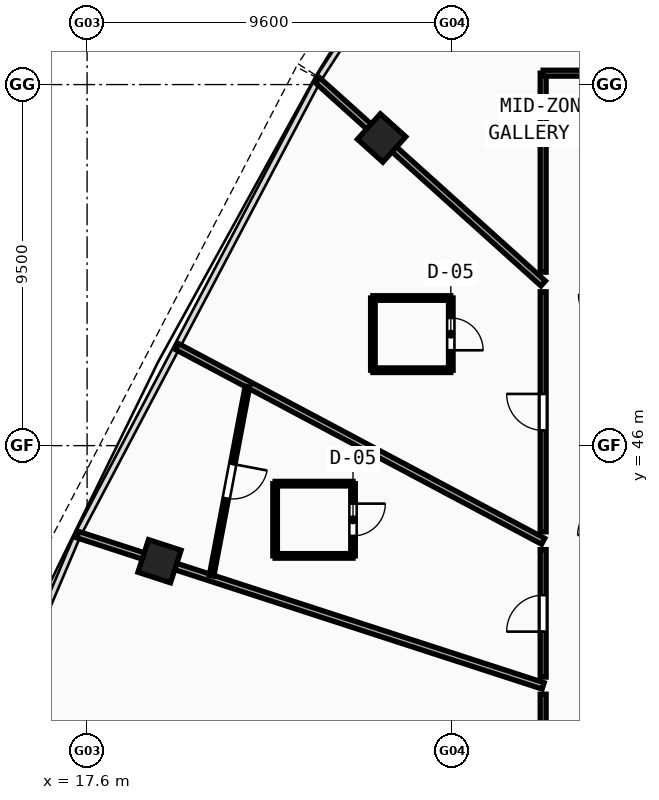
"""IFC4 building model, lengths in metres.
Left out: names, types, materials, properties, quantities, classifications, styles, units other than length and angle.
Written with IfcOpenShell. Run it as: python <this file> out.ifc"""

import sys

from ifc_helpers import new_model, si_unit, direction, frame, frame_2d, origin, origin_with_axes, origin_2d, place, context, subcontext, project, spatial, rectangle, hollow_rectangle, extrude, source, transform, mapped, element, fill, save


model = new_model("IFC4")
c1 = context("Model", 3, precision=1e-05, world=origin(), true_north=direction((0.0, 1.0)))
c2 = subcontext(c1, "Body", "Model", "MODEL_VIEW")
j1 = project(units=[si_unit("LENGTHUNIT", "METRE"), si_unit("PLANEANGLEUNIT", "RADIAN")], contexts=[c1])
p1 = place(None, origin())
s1 = spatial("IfcSite", under=j1, at=p1, CompositionType="ELEMENT")
p2 = place(p1, origin())
s2 = spatial("IfcBuilding", under=s1, at=p2, CompositionType="ELEMENT")
p3 = place(p2, frame((0.0, 0.0, 188.56)))
s3 = spatial("IfcBuildingStorey", under=s2, at=p3, CompositionType="ELEMENT", Elevation=188.56)
m1 = source(origin(), c2, "Body", "SweptSolid", [
    extrude(hollow_rectangle(XDim=0.9, YDim=0.9, WallThickness=0.036, at=origin_2d()), origin(), (0.0, 0.0, 1.0), 3.8),
])
for number, where, z_axis, x_axis in (
    (1, (25.349, 54.095, -0.26), (0.0, 0.0, 1.0), (-0.669, -0.743, 0.0)),
    (2, (19.505, 42.958, -0.26), (0.0, 0.0, 1.0), (-0.309, -0.951, 0.0)),
):
    element("IfcColumn", number, at=place(p3, frame(where, z_axis=z_axis, x_axis=x_axis)), inside=s3, PredefinedType="COLUMN", context=c2, shape_type="MappedRepresentation", body=[
        mapped(m1, transform((0.0, 0.0, 0.0), scale=1.0)),
    ])
p4 = place(p3, frame((29.6, 50.267, 0.0), z_axis=(0.0, 0.0, 1.0), x_axis=(-0.743139097079, 0.669136968335, 0.0)))
e3 = element("IfcWall", 3, at=p4, inside=s3, PredefinedType="PARTITIONING", context=c2, shape_type="SweptSolid", body=[
    extrude(rectangle(XDim=7.987, YDim=0.175, at=frame_2d((3.994, 0.0))), origin(), (0.0, 0.0, 1.0), 2.89),
])
p5 = place(p3, frame((29.6, 43.483, 0.0), z_axis=(0.0, 0.0, 1.0), x_axis=(-0.882940086537, 0.469485679853, 0.0)))
e4 = element("IfcWall", 4, at=p5, inside=s3, PredefinedType="PARTITIONING", context=c2, shape_type="SweptSolid", body=[
    extrude(rectangle(XDim=10.91, YDim=0.175, at=frame_2d((5.455, 0.0))), origin(), (0.0, 0.0, 1.0), 2.89),
])
p6 = place(p3, frame((29.6, 39.678, 0.0), z_axis=(0.0, 0.0, 1.0), x_axis=(-0.951054689993, 0.309022615097, 0.0)))
e5 = element("IfcWall", 5, at=p6, inside=s3, PredefinedType="PARTITIONING", context=c2, shape_type="SweptSolid", body=[
    extrude(rectangle(XDim=12.875, YDim=0.175, at=frame_2d((6.438, 0.0))), origin(), (0.0, 0.0, 1.0), 2.89),
])
p7 = place(p3, frame((29.6, 21.8, 0.0), z_axis=(0.0, 0.0, 1.0), x_axis=(0.0, 1.0, 0.0)))
e6 = element("IfcWall", 6, at=p7, inside=s3, PredefinedType="PARTITIONING", context=c2, shape_type="SweptSolid", body=[
    extrude(rectangle(XDim=17.659, YDim=0.155, at=frame_2d((8.829, 0.0))), origin(), (0.0, 0.0, 1.0), 2.89),
])
p8 = place(p7, frame((8.234, 0.0, 0.0)))
e7 = element("IfcOpeningElement", 7, at=p8, cuts=e6, PredefinedType="OPENING", context=c2, shape_type="SweptSolid", body=[
    extrude(rectangle(XDim=0.96, YDim=2.12, at=frame_2d((0.48, 1.06))), frame((0.0, 0.087, 0.0), z_axis=(0.0, -1.0, 0.0), x_axis=(1.0, 0.0, 0.0)), (0.0, 0.0, 1.0), 0.175),
])
p9 = place(p3, frame((29.6, 39.91, 0.0), z_axis=(0.0, 0.0, 1.0), x_axis=(0.0, 1.0, 0.0)))
e8 = element("IfcWall", 8, at=p9, inside=s3, PredefinedType="PARTITIONING", context=c2, shape_type="SweptSolid", body=[
    extrude(rectangle(XDim=3.354, YDim=0.155, at=frame_2d((1.677, 0.0))), origin(), (0.0, 0.0, 1.0), 3.54),
])
p10 = place(p9, frame((1.196, 0.0, 0.0)))
e9 = element("IfcOpeningElement", 9, at=p10, cuts=e8, PredefinedType="OPENING", context=c2, shape_type="SweptSolid", body=[
    extrude(rectangle(XDim=0.96, YDim=2.12, at=frame_2d((0.48, 1.06))), frame((0.0, 0.087, 0.0), z_axis=(0.0, -1.0, 0.0), x_axis=(1.0, 0.0, 0.0)), (0.0, 0.0, 1.0), 0.175),
])
p11 = place(p3, frame((29.6, 43.733, 0.0), z_axis=(0.0, 0.0, 1.0), x_axis=(0.0, 1.0, 0.0)))
e10 = element("IfcWall", 10, at=p11, inside=s3, PredefinedType="PARTITIONING", context=c2, shape_type="SweptSolid", body=[
    extrude(rectangle(XDim=6.315, YDim=0.155, at=frame_2d((3.157, 0.0))), origin(), (0.0, 0.0, 1.0), 2.89),
])
p12 = place(p11, frame((2.668, 0.0, 0.0)))
e11 = element("IfcOpeningElement", 11, at=p12, cuts=e10, PredefinedType="OPENING", context=c2, shape_type="SweptSolid", body=[
    extrude(rectangle(XDim=0.96, YDim=2.12, at=frame_2d((0.48, 1.06))), frame((0.0, 0.087, 0.0), z_axis=(0.0, -1.0, 0.0), x_axis=(1.0, 0.0, 0.0)), (0.0, 0.0, 1.0), 0.175),
])
p13 = place(p3, frame((29.6, 50.563, 0.0), z_axis=(0.0, 0.0, 1.0), x_axis=(0.0, 1.0, 0.0)))
e12 = element("IfcWall", 12, at=p13, inside=s3, PredefinedType="PARTITIONING", context=c2, shape_type="SweptSolid", body=[
    extrude(rectangle(XDim=5.237, YDim=0.155, at=frame_2d((2.618, 0.0))), origin(), (0.0, 0.0, 1.0), 3.54),
])
p14 = place(p3, frame((29.6, 55.8, 0.0), z_axis=(0.0, 0.0, 1.0), x_axis=(1.0, 0.0, 0.0)))
e13 = element("IfcWall", 13, at=p14, inside=s3, PredefinedType="PARTITIONING", context=c2, shape_type="SweptSolid", body=[
    extrude(rectangle(XDim=14.109, YDim=0.155, at=frame_2d((7.054, 0.0))), origin(), (0.0, 0.0, 1.0), 2.89),
])
p15 = place(p14, frame((6.385, 0.0, 0.0)))
e14 = element("IfcOpeningElement", 14, at=p15, cuts=e13, PredefinedType="OPENING", context=c2, shape_type="SweptSolid", body=[
    extrude(rectangle(XDim=0.96, YDim=2.12, at=frame_2d((0.48, 1.06))), frame((0.0, 0.087, 0.0), z_axis=(0.0, -1.0, 0.0), x_axis=(1.0, 0.0, 0.0)), (0.0, 0.0, 1.0), 0.175),
])
p16 = place(p3, frame((25.12, 47.984, 0.0), z_axis=(0.0, 0.0, 1.0), x_axis=(1.0, 0.0, 0.0)))
e15 = element("IfcWall", 15, at=p16, inside=s3, PredefinedType="PARTITIONING", context=c2, shape_type="SweptSolid", body=[
    extrude(rectangle(XDim=2.05, YDim=0.12, at=frame_2d((1.025, 0.0))), origin(), (0.0, 0.0, 1.0), 3.54),
])
p17 = place(p3, frame((27.17, 47.984, 0.0), z_axis=(0.0, 0.0, 1.0), x_axis=(0.0, 1.0, 0.0)))
e16 = element("IfcWall", 16, at=p17, inside=s3, PredefinedType="PARTITIONING", context=c2, shape_type="SweptSolid", body=[
    extrude(rectangle(XDim=1.9, YDim=0.12, at=frame_2d((0.95, 0.0))), origin(), (0.0, 0.0, 1.0), 3.54),
])
p18 = place(p17, frame((0.525, 0.0, 0.0)))
e17 = element("IfcOpeningElement", 17, at=p18, cuts=e16, PredefinedType="OPENING", context=c2, shape_type="SweptSolid", body=[
    extrude(rectangle(XDim=0.85, YDim=2.1, at=frame_2d((0.425, 1.05))), frame((0.0, 0.07, 0.0), z_axis=(0.0, -1.0, 0.0), x_axis=(1.0, 0.0, 0.0)), (0.0, 0.0, 1.0), 0.14),
])
p19 = place(p3, frame((27.17, 49.884, 0.0), z_axis=(0.0, 0.0, 1.0), x_axis=(-1.0, 0.0, 0.0)))
e18 = element("IfcWall", 18, at=p19, inside=s3, PredefinedType="PARTITIONING", context=c2, shape_type="SweptSolid", body=[
    extrude(rectangle(XDim=2.05, YDim=0.12, at=frame_2d((1.025, 0.0))), origin(), (0.0, 0.0, 1.0), 3.54),
])
p20 = place(p3, frame((25.12, 49.884, 0.0), z_axis=(0.0, 0.0, 1.0), x_axis=(0.0, -1.0, 0.0)))
e19 = element("IfcWall", 19, at=p20, inside=s3, PredefinedType="PARTITIONING", context=c2, shape_type="SweptSolid", body=[
    extrude(rectangle(XDim=1.9, YDim=0.12, at=frame_2d((0.95, 0.0))), origin(), (0.0, 0.0, 1.0), 3.54),
])
p21 = place(p3, frame((22.547, 43.099, 0.0), z_axis=(0.0, 0.0, 1.0), x_axis=(1.0, 0.0, 0.0)))
e20 = element("IfcWall", 20, at=p21, inside=s3, PredefinedType="PARTITIONING", context=c2, shape_type="SweptSolid", body=[
    extrude(rectangle(XDim=2.05, YDim=0.12, at=frame_2d((1.025, 0.0))), origin(), (0.0, 0.0, 1.0), 3.54),
])
p22 = place(p3, frame((24.597, 43.099, 0.0), z_axis=(0.0, 0.0, 1.0), x_axis=(0.0, 1.0, 0.0)))
e21 = element("IfcWall", 21, at=p22, inside=s3, PredefinedType="PARTITIONING", context=c2, shape_type="SweptSolid", body=[
    extrude(rectangle(XDim=1.9, YDim=0.12, at=frame_2d((0.95, 0.0))), origin(), (0.0, 0.0, 1.0), 3.54),
])
p23 = place(p22, frame((0.525, 0.0, 0.0)))
e22 = element("IfcOpeningElement", 22, at=p23, cuts=e21, PredefinedType="OPENING", context=c2, shape_type="SweptSolid", body=[
    extrude(rectangle(XDim=0.85, YDim=2.1, at=frame_2d((0.425, 1.05))), frame((0.0, 0.07, 0.0), z_axis=(0.0, -1.0, 0.0), x_axis=(1.0, 0.0, 0.0)), (0.0, 0.0, 1.0), 0.14),
])
p24 = place(p3, frame((24.597, 44.999, 0.0), z_axis=(0.0, 0.0, 1.0), x_axis=(-1.0, 0.0, 0.0)))
e23 = element("IfcWall", 23, at=p24, inside=s3, PredefinedType="PARTITIONING", context=c2, shape_type="SweptSolid", body=[
    extrude(rectangle(XDim=2.05, YDim=0.12, at=frame_2d((1.025, 0.0))), origin(), (0.0, 0.0, 1.0), 3.54),
])
p25 = place(p3, frame((22.547, 44.999, 0.0), z_axis=(0.0, 0.0, 1.0), x_axis=(0.0, -1.0, 0.0)))
e24 = element("IfcWall", 24, at=p25, inside=s3, PredefinedType="PARTITIONING", context=c2, shape_type="SweptSolid", body=[
    extrude(rectangle(XDim=1.9, YDim=0.12, at=frame_2d((0.95, 0.0))), origin(), (0.0, 0.0, 1.0), 3.54),
])
p26 = place(p3, frame((21.818, 47.553, 0.0), z_axis=(0.0, 0.0, 1.0), x_axis=(-0.186234987185, -0.982505231308, 0.0)))
e25 = element("IfcWall", 25, at=p26, inside=s3, PredefinedType="PARTITIONING", context=c2, shape_type="SweptSolid", body=[
    extrude(rectangle(XDim=5.065, YDim=0.12, at=frame_2d((2.533, 0.0))), origin(), (0.0, 0.0, 1.0), 2.89),
])
p27 = place(p26, frame((2.073, 0.0, 0.0)))
e26 = element("IfcOpeningElement", 26, at=p27, cuts=e25, PredefinedType="OPENING", context=c2, shape_type="SweptSolid", body=[
    extrude(rectangle(XDim=0.92, YDim=2.1, at=frame_2d((0.46, 1.05))), frame((0.0, 0.07, 0.0), z_axis=(0.0, -1.0, 0.0), x_axis=(1.0, 0.0, 0.0)), (0.0, 0.0, 1.0), 0.14),
])
m2 = source(origin(), c2, "Body", "SweptSolid", [
    extrude(rectangle(XDim=0.96, YDim=2.12, at=frame_2d((0.48, 1.06))), frame((0.0, 0.025, 0.0), z_axis=(0.0, -1.0, 0.0), x_axis=(1.0, 0.0, 0.0)), (0.0, 0.0, 1.0), 0.05),
])
p28 = place(p12, origin_with_axes())
e27 = element("IfcDoor", 27, at=p28, inside=s3, OperationType="SINGLE_SWING_RIGHT", PredefinedType="DOOR", context=c2, shape_type="MappedRepresentation", body=[
    mapped(m2, transform((0.0, 0.0, 0.0), scale=1.0)),
])
fill(e11, e27)
m3 = source(origin(), c2, "Body", "SweptSolid", [
    extrude(rectangle(XDim=0.85, YDim=2.1, at=frame_2d((0.425, 1.05))), frame((0.0, 0.025, 0.0), z_axis=(0.0, -1.0, 0.0), x_axis=(1.0, 0.0, 0.0)), (0.0, 0.0, 1.0), 0.05),
])
p29 = place(p18, frame((0.85, 0.0, 0.0), z_axis=(0.0, 0.0, 1.0), x_axis=(-1.0, 0.0, 0.0)))
e28 = element("IfcDoor", 28, at=p29, inside=s3, OperationType="SINGLE_SWING_RIGHT", PredefinedType="DOOR", context=c2, shape_type="MappedRepresentation", body=[
    mapped(m3, transform((0.0, 0.0, 0.0), scale=1.0)),
])
fill(e17, e28)
p30 = place(p10, origin_with_axes())
e29 = element("IfcDoor", 29, at=p30, inside=s3, OperationType="SINGLE_SWING_LEFT", PredefinedType="DOOR", context=c2, shape_type="MappedRepresentation", body=[
    mapped(m2, transform((0.0, 0.0, 0.0), scale=1.0)),
])
fill(e9, e29)
p31 = place(p23, frame((0.85, 0.0, 0.0), z_axis=(0.0, 0.0, 1.0), x_axis=(-1.0, 0.0, 0.0)))
e30 = element("IfcDoor", 30, at=p31, inside=s3, OperationType="SINGLE_SWING_LEFT", PredefinedType="DOOR", context=c2, shape_type="MappedRepresentation", body=[
    mapped(m3, transform((0.0, 0.0, 0.0), scale=1.0)),
])
fill(e22, e30)
m4 = source(origin(), c2, "Body", "SweptSolid", [
    extrude(rectangle(XDim=0.92, YDim=2.1, at=frame_2d((0.46, 1.05))), frame((0.0, 0.025, 0.0), z_axis=(0.0, -1.0, 0.0), x_axis=(1.0, 0.0, 0.0)), (0.0, 0.0, 1.0), 0.05),
])
p32 = place(p27, origin_with_axes())
e31 = element("IfcDoor", 31, at=p32, inside=s3, OperationType="SINGLE_SWING_LEFT", PredefinedType="DOOR", context=c2, shape_type="MappedRepresentation", body=[
    mapped(m4, transform((0.0, 0.0, 0.0), scale=1.0)),
])
fill(e26, e31)
save(model, sys.argv[1])
